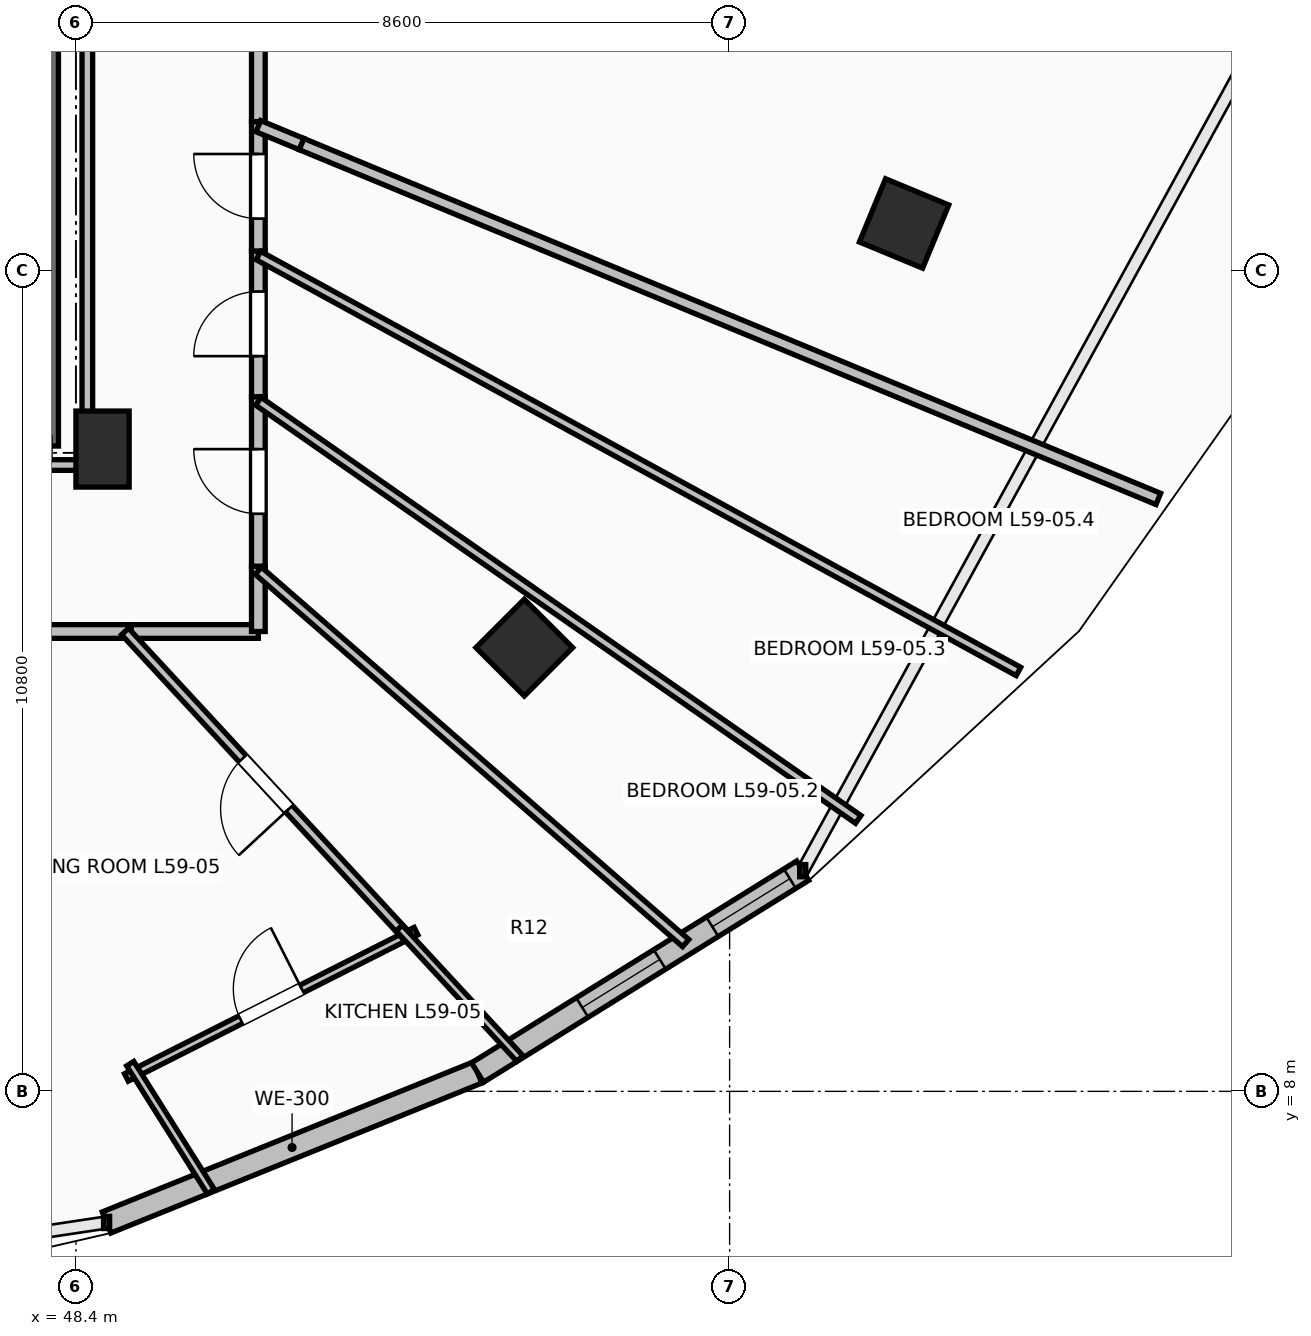
"""IFC4 building model, lengths in metres.
Left out: names, types, materials, properties, quantities, classifications, styles, units other than length and angle.
Written with IfcOpenShell. Run it as: python <this file> out.ifc"""

import sys

from ifc_helpers import new_model, si_unit, direction, frame, frame_2d, origin, origin_2d, place, context, subcontext, project, spatial, rectangle, extrude, element, fill, save


model = new_model("IFC4")
c1 = context("Model", 3, precision=1e-05, world=origin(), true_north=direction((0.0, 1.0)))
c2 = subcontext(c1, "Body", "Model", "MODEL_VIEW")
j1 = project(units=[si_unit("LENGTHUNIT", "METRE"), si_unit("PLANEANGLEUNIT", "RADIAN")], contexts=[c1])
p1 = place(None, origin())
s1 = spatial("IfcSite", under=j1, at=p1, CompositionType="ELEMENT")
p2 = place(p1, origin())
s2 = spatial("IfcBuilding", under=s1, at=p2, CompositionType="ELEMENT")
p3 = place(p2, frame((0.0, 0.0, 217.85)))
s3 = spatial("IfcBuildingStorey", under=s2, at=p3, CompositionType="ELEMENT", Elevation=217.85)
for number, where, z_axis, x_axis in (
    (1, (54.299, 13.838, 0.0), (0.0, 0.0, 1.0), (0.707, -0.707, 0.0)),
    (2, (59.295, 19.418, 0.0), (0.0, 0.0, 1.0), (0.924, -0.383, 0.0)),
):
    element("IfcColumn", number, at=place(p3, frame(where, z_axis=z_axis, x_axis=x_axis)), inside=s3, PredefinedType="COLUMN", context=c2, shape_type="SweptSolid", body=[
        extrude(rectangle(XDim=0.9, YDim=0.9, at=origin_2d()), origin(), (0.0, 0.0, 1.0), 3.55),
    ])
p4 = place(p3, frame((48.75, 16.45, 0.0), z_axis=(0.0, 0.0, 1.0), x_axis=(1.0, 0.0, 0.0)))
e3 = element("IfcColumn", 3, at=p4, inside=s3, PredefinedType="PILASTER", context=c2, shape_type="SweptSolid", body=[
    extrude(rectangle(XDim=0.7, YDim=1.0, at=origin_2d()), origin(), (0.0, 0.0, 1.0), 3.55),
])
p5 = place(p3, frame((48.803, 6.275, 0.0), z_axis=(0.0, 0.0, 1.0), x_axis=(0.927111094334, 0.374786630981, 0.0)))
e4 = element("IfcWall", 4, at=p5, inside=s3, PredefinedType="STANDARD", context=c2, shape_type="SweptSolid", body=[
    extrude(rectangle(XDim=5.264, YDim=0.3, at=frame_2d((2.632, 0.0))), origin(), (0.0, 0.0, 1.0), 3.29),
])
p6 = place(p3, frame((53.684, 8.248, 0.0), z_axis=(0.0, 0.0, 1.0), x_axis=(0.849647657754, 0.527350791858, 0.0)))
e5 = element("IfcWall", 5, at=p6, inside=s3, PredefinedType="STANDARD", context=c2, shape_type="SweptSolid", body=[
    extrude(rectangle(XDim=5.035, YDim=0.3, at=frame_2d((2.518, 0.0))), origin(), (0.0, 0.0, 1.0), 3.29),
])
p7 = place(p6, frame((1.621, 0.0, 0.85)))
e6 = element("IfcOpeningElement", 6, at=p7, cuts=e5, PredefinedType="OPENING", context=c2, shape_type="SweptSolid", body=[
    extrude(rectangle(XDim=1.2, YDim=1.95, at=frame_2d((0.6, 0.975))), frame((0.0, 0.165, 0.0), z_axis=(0.0, -1.0, 0.0), x_axis=(1.0, 0.0, 0.0)), (0.0, 0.0, 1.0), 0.33),
])
p8 = place(p6, frame((3.636, 0.0, 0.85)))
e7 = element("IfcOpeningElement", 7, at=p8, cuts=e5, PredefinedType="OPENING", context=c2, shape_type="SweptSolid", body=[
    extrude(rectangle(XDim=1.2, YDim=1.95, at=frame_2d((0.6, 0.975))), frame((0.0, 0.165, 0.0), z_axis=(0.0, -1.0, 0.0), x_axis=(1.0, 0.0, 0.0)), (0.0, 0.0, 1.0), 0.33),
])
p9 = place(p3, frame((48.06, 23.91, 0.0), z_axis=(0.0, 0.0, 1.0), x_axis=(0.0, -1.0, 0.0)))
e8 = element("IfcWall", 8, at=p9, inside=s3, PredefinedType="SOLIDWALL", context=c2, shape_type="SweptSolid", body=[
    extrude(rectangle(XDim=7.42, YDim=0.22, at=frame_2d((3.71, 0.0))), origin(), (0.0, 0.0, 1.0), 3.29),
])
p10 = place(p3, frame((45.237, 14.05, 0.0), z_axis=(0.0, 0.0, 1.0), x_axis=(1.0, 0.0, 0.0)))
e9 = element("IfcWall", 9, at=p10, inside=s3, PredefinedType="PARTITIONING", context=c2, shape_type="SweptSolid", body=[
    extrude(rectangle(XDim=3.891, YDim=0.18, at=frame_2d((1.945, 0.0))), origin(), (0.0, 0.0, 1.0), 2.482),
])
p11 = place(p10, frame((1.446, 0.0, 0.0)))
e10 = element("IfcOpeningElement", 10, at=p11, cuts=e9, PredefinedType="OPENING", context=c2, shape_type="SweptSolid", body=[
    extrude(rectangle(XDim=1.0, YDim=2.15, at=frame_2d((0.5, 1.075))), frame((0.0, 0.105, 0.0), z_axis=(0.0, -1.0, 0.0), x_axis=(1.0, 0.0, 0.0)), (0.0, 0.0, 1.0), 0.21),
])
p12 = place(p3, frame((49.128, 14.05, 0.0), z_axis=(0.0, 0.0, 1.0), x_axis=(1.0, 0.0, 0.0)))
e11 = element("IfcWall", 11, at=p12, inside=s3, PredefinedType="PARTITIONING", context=c2, shape_type="SweptSolid", body=[
    extrude(rectangle(XDim=1.672, YDim=0.18, at=frame_2d((0.836, 0.0))), origin(), (0.0, 0.0, 1.0), 2.979),
])
p13 = place(p3, frame((50.8, 14.05, 0.0), z_axis=(0.0, 0.0, 1.0), x_axis=(0.0, 1.0, 0.0)))
e12 = element("IfcWall", 12, at=p13, inside=s3, PredefinedType="PARTITIONING", context=c2, shape_type="SweptSolid", body=[
    extrude(rectangle(XDim=0.859, YDim=0.18, at=frame_2d((0.429, 0.0))), origin(), (0.0, 0.0, 1.0), 2.979),
])
p14 = place(p3, frame((50.8, 14.909, 0.0), z_axis=(0.0, 0.0, 1.0), x_axis=(0.0, 1.0, 0.0)))
e13 = element("IfcWall", 13, at=p14, inside=s3, PredefinedType="PARTITIONING", context=c2, shape_type="SweptSolid", body=[
    extrude(rectangle(XDim=2.23, YDim=0.18, at=frame_2d((1.115, 0.0))), origin(), (0.0, 0.0, 1.0), 2.482),
])
p15 = place(p14, frame((0.69, 0.0, 0.0)))
e14 = element("IfcOpeningElement", 14, at=p15, cuts=e13, PredefinedType="OPENING", context=c2, shape_type="SweptSolid", body=[
    extrude(rectangle(XDim=0.85, YDim=2.1, at=frame_2d((0.425, 1.05))), frame((0.0, 0.105, 0.0), z_axis=(0.0, -1.0, 0.0), x_axis=(1.0, 0.0, 0.0)), (0.0, 0.0, 1.0), 0.21),
])
p16 = place(p3, frame((50.8, 17.139, 0.0), z_axis=(0.0, 0.0, 1.0), x_axis=(0.0, 1.0, 0.0)))
e15 = element("IfcWall", 15, at=p16, inside=s3, PredefinedType="PARTITIONING", context=c2, shape_type="SweptSolid", body=[
    extrude(rectangle(XDim=1.917, YDim=0.18, at=frame_2d((0.958, 0.0))), origin(), (0.0, 0.0, 1.0), 3.29),
])
p17 = place(p16, frame((0.533, 0.0, 0.0)))
e16 = element("IfcOpeningElement", 16, at=p17, cuts=e15, PredefinedType="OPENING", context=c2, shape_type="SweptSolid", body=[
    extrude(rectangle(XDim=0.85, YDim=2.1, at=frame_2d((0.425, 1.05))), frame((0.0, 0.105, 0.0), z_axis=(0.0, -1.0, 0.0), x_axis=(1.0, 0.0, 0.0)), (0.0, 0.0, 1.0), 0.21),
])
p18 = place(p3, frame((50.8, 19.056, 0.0), z_axis=(0.0, 0.0, 1.0), x_axis=(0.0, 1.0, 0.0)))
e17 = element("IfcWall", 17, at=p18, inside=s3, PredefinedType="PARTITIONING", context=c2, shape_type="SweptSolid", body=[
    extrude(rectangle(XDim=1.702, YDim=0.18, at=frame_2d((0.851, 0.0))), origin(), (0.0, 0.0, 1.0), 3.29),
])
p19 = place(p18, frame((0.426, 0.0, 0.0)))
e18 = element("IfcOpeningElement", 18, at=p19, cuts=e17, PredefinedType="OPENING", context=c2, shape_type="SweptSolid", body=[
    extrude(rectangle(XDim=0.85, YDim=2.1, at=frame_2d((0.425, 1.05))), frame((0.0, 0.105, 0.0), z_axis=(0.0, -1.0, 0.0), x_axis=(1.0, 0.0, 0.0)), (0.0, 0.0, 1.0), 0.21),
])
p20 = place(p3, frame((50.8, 20.758, 0.0), z_axis=(0.0, 0.0, 1.0), x_axis=(0.0, 1.0, 0.0)))
e19 = element("IfcWall", 19, at=p20, inside=s3, PredefinedType="PARTITIONING", context=c2, shape_type="SweptSolid", body=[
    extrude(rectangle(XDim=3.792, YDim=0.18, at=frame_2d((1.896, 0.0))), origin(), (0.0, 0.0, 1.0), 3.29),
])
p21 = place(p3, frame((49.064, 8.183, 0.0), z_axis=(0.0, 0.0, 1.0), x_axis=(0.892520393298, 0.451007037136, 0.0)))
e20 = element("IfcWall", 20, at=p21, inside=s3, PredefinedType="PARTITIONING", context=c2, shape_type="SweptSolid", body=[
    extrude(rectangle(XDim=4.269, YDim=0.11, at=frame_2d((2.134, 0.0))), origin(), (0.0, 0.0, 1.0), 3.29),
])
p22 = place(p21, frame((1.684, 0.0, 0.0)))
e21 = element("IfcOpeningElement", 21, at=p22, cuts=e20, PredefinedType="OPENING", context=c2, shape_type="SweptSolid", body=[
    extrude(rectangle(XDim=0.9, YDim=2.1, at=frame_2d((0.45, 1.05))), frame((0.0, 0.07, 0.0), z_axis=(0.0, -1.0, 0.0), x_axis=(1.0, 0.0, 0.0)), (0.0, 0.0, 1.0), 0.14),
])
p23 = place(p3, frame((50.175, 6.681, 0.0), z_axis=(0.0, 0.0, 1.0), x_axis=(-0.532930456912, 0.846159044208, 0.0)))
e22 = element("IfcWall", 22, at=p23, inside=s3, PredefinedType="PARTITIONING", context=c2, shape_type="SweptSolid", body=[
    extrude(rectangle(XDim=1.989, YDim=0.11, at=frame_2d((0.995, 0.0))), origin(), (0.0, 0.0, 1.0), 3.29),
])
p24 = place(p3, frame((52.749, 10.045, 0.0), z_axis=(0.0, 0.0, 1.0), x_axis=(-0.678882171058, 0.734247232081, 0.0)))
e23 = element("IfcWall", 23, at=p24, inside=s3, PredefinedType="PARTITIONING", context=c2, shape_type="SweptSolid", body=[
    extrude(rectangle(XDim=5.455, YDim=0.125, at=frame_2d((2.728, 0.0))), origin(), (0.0, 0.0, 1.0), 2.824),
])
p25 = place(p24, frame((2.277, 0.0, 0.0)))
e24 = element("IfcOpeningElement", 24, at=p25, cuts=e23, PredefinedType="OPENING", context=c2, shape_type="SweptSolid", body=[
    extrude(rectangle(XDim=0.9, YDim=2.1, at=frame_2d((0.45, 1.05))), frame((0.0, 0.077, 0.0), z_axis=(0.0, -1.0, 0.0), x_axis=(1.0, 0.0, 0.0)), (0.0, 0.0, 1.0), 0.155),
])
p26 = place(p3, frame((54.24, 8.432, 0.0), z_axis=(0.0, 0.0, 1.0), x_axis=(-0.678818101482, 0.734306465381, 0.0)))
e25 = element("IfcWall", 25, at=p26, inside=s3, PredefinedType="PARTITIONING", context=c2, shape_type="SweptSolid", body=[
    extrude(rectangle(XDim=2.336, YDim=0.11, at=frame_2d((1.168, 0.0))), origin(), (0.0, 0.0, 1.0), 3.29),
])
p27 = place(p3, frame((56.422, 9.951, 0.0), z_axis=(0.0, 0.0, 1.0), x_axis=(-0.753978537067, 0.656899052856, 0.0)))
e26 = element("IfcWall", 26, at=p27, inside=s3, PredefinedType="PARTITIONING", context=c2, shape_type="SweptSolid", body=[
    extrude(rectangle(XDim=7.457, YDim=0.125, at=frame_2d((3.728, 0.0))), origin(), (0.0, 0.0, 1.0), 2.824),
])
p28 = place(p3, frame((58.692, 11.578, 0.0), z_axis=(0.0, 0.0, 1.0), x_axis=(-0.820357038452, 0.571851667361, 0.0)))
e27 = element("IfcWall", 27, at=p28, inside=s3, PredefinedType="PARTITIONING", context=c2, shape_type="SweptSolid", body=[
    extrude(rectangle(XDim=9.62, YDim=0.125, at=frame_2d((4.81, 0.0))), origin(), (0.0, 0.0, 1.0), 2.824),
])
p29 = place(p3, frame((60.8, 13.524, 0.0), z_axis=(0.0, 0.0, 1.0), x_axis=(-0.877244884683, 0.480043135871, 0.0)))
e28 = element("IfcWall", 28, at=p29, inside=s3, PredefinedType="PARTITIONING", context=c2, shape_type="SweptSolid", body=[
    extrude(rectangle(XDim=11.399, YDim=0.125, at=frame_2d((5.7, 0.0))), origin(), (0.0, 0.0, 1.0), 2.824),
])
p30 = place(p3, frame((51.369, 20.462, 0.0), z_axis=(0.0, 0.0, 1.0), x_axis=(-0.923615496363, 0.383320251066, 0.0)))
e29 = element("IfcWall", 29, at=p30, inside=s3, PredefinedType="PARTITIONING", context=c2, shape_type="SweptSolid", body=[
    extrude(rectangle(XDim=0.616, YDim=0.16, at=frame_2d((0.308, 0.0))), origin(), (0.0, 0.0, 1.0), 3.29),
])
p31 = place(p3, frame((62.64, 15.794, 0.0), z_axis=(0.0, 0.0, 1.0), x_axis=(-0.923897809723, 0.382639304291, 0.0)))
e30 = element("IfcWall", 30, at=p31, inside=s3, PredefinedType="PARTITIONING", context=c2, shape_type="SweptSolid", body=[
    extrude(rectangle(XDim=12.199, YDim=0.16, at=frame_2d((6.1, 0.0))), origin(), (0.0, 0.0, 1.0), 2.824),
])
p32 = place(p3, frame((44.805, 16.24, 0.0), z_axis=(0.0, 0.0, 1.0), x_axis=(1.0, 0.0, 0.0)))
e31 = element("IfcWall", 31, at=p32, inside=s3, PredefinedType="PARTITIONING", context=c2, shape_type="SweptSolid", body=[
    extrude(rectangle(XDim=3.745, YDim=0.14, at=frame_2d((1.873, 0.0))), origin(), (0.0, 0.0, 1.0), 2.482),
])
p33 = place(p3, frame((48.55, 16.24, 0.0), z_axis=(0.0, 0.0, 1.0), x_axis=(0.0, 1.0, 0.0)))
e32 = element("IfcWall", 32, at=p33, inside=s3, PredefinedType="PARTITIONING", context=c2, shape_type="SweptSolid", body=[
    extrude(rectangle(XDim=7.514, YDim=0.14, at=frame_2d((3.757, 0.0))), origin(), (0.0, 0.0, 1.0), 2.482),
])
p34 = place(p7, origin())
e33 = element("IfcWindow", 33, at=p34, inside=s3, PartitioningType="SINGLE_PANEL", PredefinedType="WINDOW", context=c2, shape_type="SweptSolid", body=[
    extrude(rectangle(XDim=1.2, YDim=1.95, at=frame_2d((0.6, 0.975))), frame((0.0, 0.03, 0.0), z_axis=(0.0, -1.0, 0.0), x_axis=(1.0, 0.0, 0.0)), (0.0, 0.0, 1.0), 0.06),
])
fill(e6, e33)
p35 = place(p8, origin())
e34 = element("IfcWindow", 34, at=p35, inside=s3, PartitioningType="SINGLE_PANEL", PredefinedType="WINDOW", context=c2, shape_type="SweptSolid", body=[
    extrude(rectangle(XDim=1.2, YDim=1.95, at=frame_2d((0.6, 0.975))), frame((0.0, 0.03, 0.0), z_axis=(0.0, -1.0, 0.0), x_axis=(1.0, 0.0, 0.0)), (0.0, 0.0, 1.0), 0.06),
])
fill(e7, e34)
p36 = place(p22, origin())
e35 = element("IfcDoor", 35, at=p36, inside=s3, OperationType="SINGLE_SWING_RIGHT", PredefinedType="DOOR", context=c2, shape_type="SweptSolid", body=[
    extrude(rectangle(XDim=0.9, YDim=2.1, at=frame_2d((0.45, 1.05))), frame((0.0, 0.025, 0.0), z_axis=(0.0, -1.0, 0.0), x_axis=(1.0, 0.0, 0.0)), (0.0, 0.0, 1.0), 0.05),
])
fill(e21, e35)
p37 = place(p25, origin())
e36 = element("IfcDoor", 36, at=p37, inside=s3, OperationType="SINGLE_SWING_LEFT", PredefinedType="DOOR", context=c2, shape_type="SweptSolid", body=[
    extrude(rectangle(XDim=0.9, YDim=2.1, at=frame_2d((0.45, 1.05))), frame((0.0, 0.025, 0.0), z_axis=(0.0, -1.0, 0.0), x_axis=(1.0, 0.0, 0.0)), (0.0, 0.0, 1.0), 0.05),
])
fill(e24, e36)
p38 = place(p15, origin())
e37 = element("IfcDoor", 37, at=p38, inside=s3, OperationType="SINGLE_SWING_RIGHT", PredefinedType="DOOR", context=c2, shape_type="SweptSolid", body=[
    extrude(rectangle(XDim=0.85, YDim=2.1, at=frame_2d((0.425, 1.05))), frame((0.0, 0.025, 0.0), z_axis=(0.0, -1.0, 0.0), x_axis=(1.0, 0.0, 0.0)), (0.0, 0.0, 1.0), 0.05),
])
fill(e14, e37)
p39 = place(p17, origin())
e38 = element("IfcDoor", 38, at=p39, inside=s3, OperationType="SINGLE_SWING_LEFT", PredefinedType="DOOR", context=c2, shape_type="SweptSolid", body=[
    extrude(rectangle(XDim=0.85, YDim=2.1, at=frame_2d((0.425, 1.05))), frame((0.0, 0.025, 0.0), z_axis=(0.0, -1.0, 0.0), x_axis=(1.0, 0.0, 0.0)), (0.0, 0.0, 1.0), 0.05),
])
fill(e16, e38)
p40 = place(p19, origin())
e39 = element("IfcDoor", 39, at=p40, inside=s3, OperationType="SINGLE_SWING_RIGHT", PredefinedType="DOOR", context=c2, shape_type="SweptSolid", body=[
    extrude(rectangle(XDim=0.85, YDim=2.1, at=frame_2d((0.425, 1.05))), frame((0.0, 0.025, 0.0), z_axis=(0.0, -1.0, 0.0), x_axis=(1.0, 0.0, 0.0)), (0.0, 0.0, 1.0), 0.05),
])
fill(e18, e39)
save(model, sys.argv[1])
